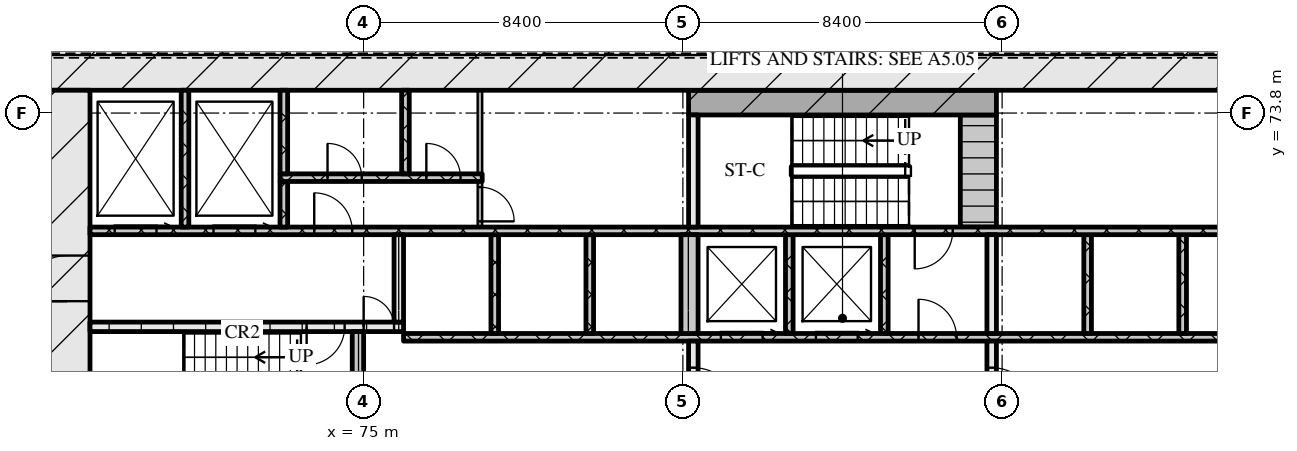
"""IFC4 building model, lengths in metres.
Left out: names, types, materials, properties, quantities, classifications, styles, units other than length and angle.
Written with IfcOpenShell. Run it as: python <this file> out.ifc"""

import sys

from ifc_helpers import new_model, si_unit, direction, frame, frame_2d, origin, place, context, subcontext, project, spatial, rectangle, extrude, element, fill, save


model = new_model("IFC4")
c1 = context("Model", 3, precision=1e-05, world=origin(), true_north=direction((0.0, 1.0)))
c2 = subcontext(c1, "Body", "Model", "MODEL_VIEW")
j1 = project(units=[si_unit("LENGTHUNIT", "METRE"), si_unit("PLANEANGLEUNIT", "RADIAN")], contexts=[c1])
p1 = place(None, origin())
s1 = spatial("IfcSite", under=j1, at=p1, CompositionType="ELEMENT")
p2 = place(p1, origin())
s2 = spatial("IfcBuilding", under=s1, at=p2, CompositionType="ELEMENT")
p3 = place(p2, frame((0.0, 0.0, 19.2)))
s3 = spatial("IfcBuildingStorey", under=s2, at=p3, CompositionType="ELEMENT", Elevation=19.2)
p4 = place(p3, frame((66.6, 75.0, 0.0), z_axis=(0.0, 0.0, 1.0), x_axis=(1.0, 0.0, 0.0)))
e1 = element("IfcWall", 1, at=p4, inside=s3, PredefinedType="SOLIDWALL", context=c2, shape_type="SweptSolid", body=[
    extrude(rectangle(XDim=42.0, YDim=1.2, at=frame_2d((21.0, 0.0))), origin(), (0.0, 0.0, 1.0), 4.2),
])
p5 = place(p3, frame((67.2, 62.4, 0.0), z_axis=(0.0, 0.0, 1.0), x_axis=(0.0, 1.0, 0.0)))
e2 = element("IfcWall", 2, at=p5, inside=s3, PredefinedType="SOLIDWALL", context=c2, shape_type="SweptSolid", body=[
    extrude(rectangle(XDim=12.0, YDim=1.2, at=frame_2d((6.0, 0.0))), origin(), (0.0, 0.0, 1.0), 4.2),
])
p6 = place(p5, frame((6.45, 0.0, 0.0)))
e3 = element("IfcOpeningElement", 3, at=p6, cuts=e2, PredefinedType="OPENING", context=c2, shape_type="SweptSolid", body=[
    extrude(rectangle(XDim=1.2, YDim=2.1, at=frame_2d((0.6, 1.05))), frame((0.0, 0.61, 0.0), z_axis=(0.0, -1.0, 0.0), x_axis=(1.0, 0.0, 0.0)), (0.0, 0.0, 1.0), 1.22),
])
p7 = place(p3, frame((74.85, 65.2, 0.0), z_axis=(0.0, 0.0, 1.0), x_axis=(0.0, 1.0, 0.0)))
e4 = element("IfcWall", 4, at=p7, inside=s3, PredefinedType="SOLIDWALL", context=c2, shape_type="SweptSolid", body=[
    extrude(rectangle(XDim=2.85, YDim=0.3, at=frame_2d((1.425, 0.0))), origin(), (0.0, 0.0, 1.0), 4.2),
])
p8 = place(p3, frame((83.675, 65.2, 0.0), z_axis=(0.0, 0.0, 1.0), x_axis=(0.0, 1.0, 0.0)))
e5 = element("IfcWall", 5, at=p8, inside=s3, PredefinedType="SOLIDWALL", context=c2, shape_type="SweptSolid", body=[
    extrude(rectangle(XDim=2.6, YDim=0.25, at=frame_2d((1.3, 0.0))), origin(), (0.0, 0.0, 1.0), 4.2),
])
p9 = place(p8, frame((0.7, 0.0, 0.0)))
e6 = element("IfcOpeningElement", 6, at=p9, cuts=e5, PredefinedType="OPENING", context=c2, shape_type="SweptSolid", body=[
    extrude(rectangle(XDim=1.2, YDim=2.1, at=frame_2d((0.6, 1.05))), frame((0.0, 0.135, 0.0), z_axis=(0.0, -1.0, 0.0), x_axis=(1.0, 0.0, 0.0)), (0.0, 0.0, 1.0), 0.27),
])
p10 = place(p3, frame((91.525, 65.2, 0.0), z_axis=(0.0, 0.0, 1.0), x_axis=(0.0, 1.0, 0.0)))
e7 = element("IfcWall", 7, at=p10, inside=s3, PredefinedType="SOLIDWALL", context=c2, shape_type="SweptSolid", body=[
    extrude(rectangle(XDim=2.6, YDim=0.25, at=frame_2d((1.3, 0.0))), origin(), (0.0, 0.0, 1.0), 4.2),
])
p11 = place(p10, frame((0.7, 0.0, 0.0)))
e8 = element("IfcOpeningElement", 8, at=p11, cuts=e7, PredefinedType="OPENING", context=c2, shape_type="SweptSolid", body=[
    extrude(rectangle(XDim=1.2, YDim=2.1, at=frame_2d((0.6, 1.05))), frame((0.0, 0.135, 0.0), z_axis=(0.0, -1.0, 0.0), x_axis=(1.0, 0.0, 0.0)), (0.0, 0.0, 1.0), 0.27),
])
p12 = place(p3, frame((76.05, 67.9, 0.0), z_axis=(0.0, 0.0, 1.0), x_axis=(1.0, 0.0, 0.0)))
e9 = element("IfcWall", 9, at=p12, inside=s3, PredefinedType="SOLIDWALL", context=c2, shape_type="SweptSolid", body=[
    extrude(rectangle(XDim=23.1, YDim=0.2, at=frame_2d((11.55, 0.0))), origin(), (0.0, 0.0, 1.0), 4.2),
])
p13 = place(p12, frame((8.35, 0.0, 0.0)))
e10 = element("IfcOpeningElement", 10, at=p13, cuts=e9, PredefinedType="OPENING", context=c2, shape_type="SweptSolid", body=[
    extrude(rectangle(XDim=1.1, YDim=2.1, at=frame_2d((0.55, 1.05))), frame((0.0, 0.11, 0.0), z_axis=(0.0, -1.0, 0.0), x_axis=(1.0, 0.0, 0.0)), (0.0, 0.0, 1.0), 0.22),
])
p14 = place(p12, frame((10.85, 0.0, 0.0)))
e11 = element("IfcOpeningElement", 11, at=p14, cuts=e9, PredefinedType="OPENING", context=c2, shape_type="SweptSolid", body=[
    extrude(rectangle(XDim=1.1, YDim=2.1, at=frame_2d((0.55, 1.05))), frame((0.0, 0.11, 0.0), z_axis=(0.0, -1.0, 0.0), x_axis=(1.0, 0.0, 0.0)), (0.0, 0.0, 1.0), 0.22),
])
p15 = place(p12, frame((13.55, 0.0, 0.0)))
e12 = element("IfcOpeningElement", 12, at=p15, cuts=e9, PredefinedType="OPENING", context=c2, shape_type="SweptSolid", body=[
    extrude(rectangle(XDim=1.0, YDim=2.1, at=frame_2d((0.5, 1.05))), frame((0.0, 0.11, 0.0), z_axis=(0.0, -1.0, 0.0), x_axis=(1.0, 0.0, 0.0)), (0.0, 0.0, 1.0), 0.22),
])
for number, where, z_axis, x_axis in (
    (13, (78.45, 68.0, 0.0), (0.0, 0.0, 1.0), (0.0, 1.0, 0.0)),
    (14, (80.95, 68.0, 0.0), (0.0, 0.0, 1.0), (0.0, 1.0, 0.0)),
):
    element("IfcWall", number, at=place(p3, frame(where, z_axis=z_axis, x_axis=x_axis)), inside=s3, PredefinedType="SOLIDWALL", context=c2, shape_type="SweptSolid", body=[
        extrude(rectangle(XDim=2.6, YDim=0.2, at=frame_2d((1.3, 0.0))), origin(), (0.0, 0.0, 1.0), 4.2),
    ])
p16 = place(p3, frame((83.575, 68.0, 0.0), z_axis=(0.0, 0.0, 1.0), x_axis=(0.0, 1.0, 0.0)))
e15 = element("IfcWall", 15, at=p16, inside=s3, PredefinedType="SOLIDWALL", context=c2, shape_type="SweptSolid", body=[
    extrude(rectangle(XDim=2.6, YDim=0.45, at=frame_2d((1.3, 0.0))), origin(), (0.0, 0.0, 1.0), 4.2),
])
for number, where, z_axis, x_axis in (
    (16, (86.2, 68.0, 0.0), (0.0, 0.0, 1.0), (0.0, 1.0, 0.0)),
    (17, (88.7, 68.0, 0.0), (0.0, 0.0, 1.0), (0.0, 1.0, 0.0)),
):
    element("IfcWall", number, at=place(p3, frame(where, z_axis=z_axis, x_axis=x_axis)), inside=s3, PredefinedType="SOLIDWALL", context=c2, shape_type="SweptSolid", body=[
        extrude(rectangle(XDim=2.6, YDim=0.2, at=frame_2d((1.3, 0.0))), origin(), (0.0, 0.0, 1.0), 4.2),
    ])
p17 = place(p3, frame((91.525, 68.0, 0.0), z_axis=(0.0, 0.0, 1.0), x_axis=(0.0, 1.0, 0.0)))
e18 = element("IfcWall", 18, at=p17, inside=s3, PredefinedType="SOLIDWALL", context=c2, shape_type="SweptSolid", body=[
    extrude(rectangle(XDim=2.6, YDim=0.25, at=frame_2d((1.3, 0.0))), origin(), (0.0, 0.0, 1.0), 4.2),
])
for number, where, z_axis, x_axis in (
    (19, (94.05, 68.0, 0.0), (0.0, 0.0, 1.0), (0.0, 1.0, 0.0)),
    (20, (96.55, 68.0, 0.0), (0.0, 0.0, 1.0), (0.0, 1.0, 0.0)),
):
    element("IfcWall", number, at=place(p3, frame(where, z_axis=z_axis, x_axis=x_axis)), inside=s3, PredefinedType="SOLIDWALL", context=c2, shape_type="SweptSolid", body=[
        extrude(rectangle(XDim=2.6, YDim=0.2, at=frame_2d((1.3, 0.0))), origin(), (0.0, 0.0, 1.0), 4.2),
    ])
p18 = place(p3, frame((67.8, 68.175, 0.0), z_axis=(0.0, 0.0, 1.0), x_axis=(1.0, 0.0, 0.0)))
e21 = element("IfcWall", 21, at=p18, inside=s3, PredefinedType="SOLIDWALL", context=c2, shape_type="SweptSolid", body=[
    extrude(rectangle(XDim=8.25, YDim=0.25, at=frame_2d((4.125, 0.0))), origin(), (0.0, 0.0, 1.0), 4.2),
])
p19 = place(p18, frame((5.7, 0.0, 0.0)))
e22 = element("IfcOpeningElement", 22, at=p19, cuts=e21, PredefinedType="OPENING", context=c2, shape_type="SweptSolid", body=[
    extrude(rectangle(XDim=1.0, YDim=2.1, at=frame_2d((0.5, 1.05))), frame((0.0, 0.135, 0.0), z_axis=(0.0, -1.0, 0.0), x_axis=(1.0, 0.0, 0.0)), (0.0, 0.0, 1.0), 0.27),
])
p20 = place(p18, frame((7.2, 0.0, 0.0)))
e23 = element("IfcOpeningElement", 23, at=p20, cuts=e21, PredefinedType="OPENING", context=c2, shape_type="SweptSolid", body=[
    extrude(rectangle(XDim=0.8, YDim=2.1, at=frame_2d((0.4, 1.05))), frame((0.0, 0.135, 0.0), z_axis=(0.0, -1.0, 0.0), x_axis=(1.0, 0.0, 0.0)), (0.0, 0.0, 1.0), 0.27),
])
p21 = place(p3, frame((75.925, 68.3, 0.0), z_axis=(0.0, 0.0, 1.0), x_axis=(0.0, 1.0, 0.0)))
e24 = element("IfcWall", 24, at=p21, inside=s3, PredefinedType="SOLIDWALL", context=c2, shape_type="SweptSolid", body=[
    extrude(rectangle(XDim=2.3, YDim=0.25, at=frame_2d((1.15, 0.0))), origin(), (0.0, 0.0, 1.0), 4.2),
])
p22 = place(p3, frame((67.8, 70.7, 0.0), z_axis=(0.0, 0.0, 1.0), x_axis=(1.0, 0.0, 0.0)))
e25 = element("IfcWall", 25, at=p22, inside=s3, PredefinedType="SOLIDWALL", context=c2, shape_type="SweptSolid", body=[
    extrude(rectangle(XDim=39.6, YDim=0.2, at=frame_2d((19.8, 0.0))), origin(), (0.0, 0.0, 1.0), 4.2),
])
p23 = place(p22, frame((0.65, 0.0, 0.0)))
e26 = element("IfcOpeningElement", 26, at=p23, cuts=e25, PredefinedType="OPENING", context=c2, shape_type="SweptSolid", body=[
    extrude(rectangle(XDim=1.1, YDim=2.1, at=frame_2d((0.55, 1.05))), frame((0.0, 0.11, 0.0), z_axis=(0.0, -1.0, 0.0), x_axis=(1.0, 0.0, 0.0)), (0.0, 0.0, 1.0), 0.22),
])
p24 = place(p22, frame((3.25, 0.0, 0.0)))
e27 = element("IfcOpeningElement", 27, at=p24, cuts=e25, PredefinedType="OPENING", context=c2, shape_type="SweptSolid", body=[
    extrude(rectangle(XDim=1.1, YDim=2.1, at=frame_2d((0.55, 1.05))), frame((0.0, 0.11, 0.0), z_axis=(0.0, -1.0, 0.0), x_axis=(1.0, 0.0, 0.0)), (0.0, 0.0, 1.0), 0.22),
])
p25 = place(p22, frame((5.9, 0.0, 0.0)))
e28 = element("IfcOpeningElement", 28, at=p25, cuts=e25, PredefinedType="OPENING", context=c2, shape_type="SweptSolid", body=[
    extrude(rectangle(XDim=1.0, YDim=2.1, at=frame_2d((0.5, 1.05))), frame((0.0, 0.11, 0.0), z_axis=(0.0, -1.0, 0.0), x_axis=(1.0, 0.0, 0.0)), (0.0, 0.0, 1.0), 0.22),
])
p26 = place(p22, frame((21.7, 0.0, 0.0)))
e29 = element("IfcOpeningElement", 29, at=p26, cuts=e25, PredefinedType="OPENING", context=c2, shape_type="SweptSolid", body=[
    extrude(rectangle(XDim=1.0, YDim=2.1, at=frame_2d((0.5, 1.05))), frame((0.0, 0.11, 0.0), z_axis=(0.0, -1.0, 0.0), x_axis=(1.0, 0.0, 0.0)), (0.0, 0.0, 1.0), 0.22),
])
p27 = place(p22, frame((32.7, 0.0, 0.0)))
e30 = element("IfcOpeningElement", 30, at=p27, cuts=e25, PredefinedType="OPENING", context=c2, shape_type="SweptSolid", body=[
    extrude(rectangle(XDim=1.0, YDim=2.1, at=frame_2d((0.5, 1.05))), frame((0.0, 0.11, 0.0), z_axis=(0.0, -1.0, 0.0), x_axis=(1.0, 0.0, 0.0)), (0.0, 0.0, 1.0), 0.22),
])
p28 = place(p22, frame((35.25, 0.0, 0.0)))
e31 = element("IfcOpeningElement", 31, at=p28, cuts=e25, PredefinedType="OPENING", context=c2, shape_type="SweptSolid", body=[
    extrude(rectangle(XDim=1.1, YDim=2.1, at=frame_2d((0.55, 1.05))), frame((0.0, 0.11, 0.0), z_axis=(0.0, -1.0, 0.0), x_axis=(1.0, 0.0, 0.0)), (0.0, 0.0, 1.0), 0.22),
])
p29 = place(p22, frame((37.85, 0.0, 0.0)))
e32 = element("IfcOpeningElement", 32, at=p29, cuts=e25, PredefinedType="OPENING", context=c2, shape_type="SweptSolid", body=[
    extrude(rectangle(XDim=1.1, YDim=2.1, at=frame_2d((0.55, 1.05))), frame((0.0, 0.11, 0.0), z_axis=(0.0, -1.0, 0.0), x_axis=(1.0, 0.0, 0.0)), (0.0, 0.0, 1.0), 0.22),
])
p30 = place(p3, frame((70.3, 70.8, 0.0), z_axis=(0.0, 0.0, 1.0), x_axis=(0.0, 1.0, 0.0)))
e33 = element("IfcWall", 33, at=p30, inside=s3, PredefinedType="SOLIDWALL", context=c2, shape_type="SweptSolid", body=[
    extrude(rectangle(XDim=3.6, YDim=0.2, at=frame_2d((1.8, 0.0))), origin(), (0.0, 0.0, 1.0), 4.2),
])
p31 = place(p3, frame((72.9, 70.8, 0.0), z_axis=(0.0, 0.0, 1.0), x_axis=(0.0, 1.0, 0.0)))
e34 = element("IfcWall", 34, at=p31, inside=s3, PredefinedType="SOLIDWALL", context=c2, shape_type="SweptSolid", body=[
    extrude(rectangle(XDim=1.2, YDim=0.2, at=frame_2d((0.6, 0.0))), origin(), (0.0, 0.0, 1.0), 4.2),
])
p32 = place(p3, frame((78.06, 70.8, 0.0), z_axis=(0.0, 0.0, 1.0), x_axis=(0.0, 1.0, 0.0)))
e35 = element("IfcWall", 35, at=p32, inside=s3, PredefinedType="PARTITIONING", context=c2, shape_type="SweptSolid", body=[
    extrude(rectangle(XDim=1.2, YDim=0.12, at=frame_2d((0.6, 0.0))), origin(), (0.0, 0.0, 1.0), 4.2),
])
p33 = place(p32, frame((0.15, 0.0, 0.0)))
e36 = element("IfcOpeningElement", 36, at=p33, cuts=e35, PredefinedType="OPENING", context=c2, shape_type="SweptSolid", body=[
    extrude(rectangle(XDim=0.9, YDim=2.1, at=frame_2d((0.45, 1.05))), frame((0.0, 0.07, 0.0), z_axis=(0.0, -1.0, 0.0), x_axis=(1.0, 0.0, 0.0)), (0.0, 0.0, 1.0), 0.14),
])
p34 = place(p3, frame((83.675, 70.8, 0.0), z_axis=(0.0, 0.0, 1.0), x_axis=(0.0, 1.0, 0.0)))
e37 = element("IfcWall", 37, at=p34, inside=s3, PredefinedType="SOLIDWALL", context=c2, shape_type="SweptSolid", body=[
    extrude(rectangle(XDim=2.95, YDim=0.25, at=frame_2d((1.475, 0.0))), origin(), (0.0, 0.0, 1.0), 4.2),
])
p35 = place(p3, frame((91.175, 70.8, 0.0), z_axis=(0.0, 0.0, 1.0), x_axis=(0.0, 1.0, 0.0)))
e38 = element("IfcWall", 38, at=p35, inside=s3, PredefinedType="SOLIDWALL", context=c2, shape_type="SweptSolid", body=[
    extrude(rectangle(XDim=2.95, YDim=0.95, at=frame_2d((1.475, 0.0))), origin(), (0.0, 0.0, 1.0), 4.2),
])
p36 = place(p3, frame((72.8, 72.1, 0.0), z_axis=(0.0, 0.0, 1.0), x_axis=(1.0, 0.0, 0.0)))
e39 = element("IfcWall", 39, at=p36, inside=s3, PredefinedType="SOLIDWALL", context=c2, shape_type="SweptSolid", body=[
    extrude(rectangle(XDim=5.32, YDim=0.2, at=frame_2d((2.66, 0.0))), origin(), (0.0, 0.0, 1.0), 4.2),
])
p37 = place(p36, frame((1.25, 0.0, 0.0)))
e40 = element("IfcOpeningElement", 40, at=p37, cuts=e39, PredefinedType="OPENING", context=c2, shape_type="SweptSolid", body=[
    extrude(rectangle(XDim=0.9, YDim=2.1, at=frame_2d((0.45, 1.05))), frame((0.0, 0.11, 0.0), z_axis=(0.0, -1.0, 0.0), x_axis=(1.0, 0.0, 0.0)), (0.0, 0.0, 1.0), 0.22),
])
p38 = place(p36, frame((3.85, 0.0, 0.0)))
e41 = element("IfcOpeningElement", 41, at=p38, cuts=e39, PredefinedType="OPENING", context=c2, shape_type="SweptSolid", body=[
    extrude(rectangle(XDim=0.9, YDim=2.1, at=frame_2d((0.45, 1.05))), frame((0.0, 0.11, 0.0), z_axis=(0.0, -1.0, 0.0), x_axis=(1.0, 0.0, 0.0)), (0.0, 0.0, 1.0), 0.22),
])
for number, where, z_axis, x_axis in (
    (42, (72.9, 72.2, 0.0), (0.0, 0.0, 1.0), (0.0, 1.0, 0.0)),
    (43, (76.1, 72.2, 0.0), (0.0, 0.0, 1.0), (0.0, 1.0, 0.0)),
):
    element("IfcWall", number, at=place(p3, frame(where, z_axis=z_axis, x_axis=x_axis)), inside=s3, PredefinedType="SOLIDWALL", context=c2, shape_type="SweptSolid", body=[
        extrude(rectangle(XDim=2.2, YDim=0.2, at=frame_2d((1.1, 0.0))), origin(), (0.0, 0.0, 1.0), 4.2),
    ])
p39 = place(p3, frame((78.06, 72.2, 0.0), z_axis=(0.0, 0.0, 1.0), x_axis=(0.0, 1.0, 0.0)))
e44 = element("IfcWall", 44, at=p39, inside=s3, PredefinedType="PARTITIONING", context=c2, shape_type="SweptSolid", body=[
    extrude(rectangle(XDim=2.2, YDim=0.12, at=frame_2d((1.1, 0.0))), origin(), (0.0, 0.0, 1.0), 4.2),
])
p40 = place(p3, frame((83.55, 74.075, 0.0), z_axis=(0.0, 0.0, 1.0), x_axis=(1.0, 0.0, 0.0)))
e45 = element("IfcWall", 45, at=p40, inside=s3, PredefinedType="SOLIDWALL", context=c2, shape_type="SweptSolid", body=[
    extrude(rectangle(XDim=8.1, YDim=0.65, at=frame_2d((4.05, 0.0))), origin(), (0.0, 0.0, 1.0), 4.2),
])
p41 = place(p9, origin())
e46 = element("IfcDoor", 46, at=p41, inside=s3, OperationType="SINGLE_SWING_RIGHT", PredefinedType="DOOR", context=c2, shape_type="SweptSolid", body=[
    extrude(rectangle(XDim=1.2, YDim=2.1, at=frame_2d((0.6, 1.05))), frame((0.0, 0.025, 0.0), z_axis=(0.0, -1.0, 0.0), x_axis=(1.0, 0.0, 0.0)), (0.0, 0.0, 1.0), 0.05),
])
fill(e6, e46)
p42 = place(p11, origin())
e47 = element("IfcDoor", 47, at=p42, inside=s3, OperationType="SINGLE_SWING_RIGHT", PredefinedType="DOOR", context=c2, shape_type="SweptSolid", body=[
    extrude(rectangle(XDim=1.2, YDim=2.1, at=frame_2d((0.6, 1.05))), frame((0.0, 0.025, 0.0), z_axis=(0.0, -1.0, 0.0), x_axis=(1.0, 0.0, 0.0)), (0.0, 0.0, 1.0), 0.05),
])
fill(e8, e47)
p43 = place(p13, origin())
e48 = element("IfcDoor", 48, at=p43, inside=s3, OperationType="SLIDING_TO_RIGHT", PredefinedType="DOOR", context=c2, shape_type="SweptSolid", body=[
    extrude(rectangle(XDim=1.1, YDim=2.1, at=frame_2d((0.55, 1.05))), frame((0.0, 0.025, 0.0), z_axis=(0.0, -1.0, 0.0), x_axis=(1.0, 0.0, 0.0)), (0.0, 0.0, 1.0), 0.05),
])
fill(e10, e48)
p44 = place(p14, origin())
e49 = element("IfcDoor", 49, at=p44, inside=s3, OperationType="SLIDING_TO_RIGHT", PredefinedType="DOOR", context=c2, shape_type="SweptSolid", body=[
    extrude(rectangle(XDim=1.1, YDim=2.1, at=frame_2d((0.55, 1.05))), frame((0.0, 0.025, 0.0), z_axis=(0.0, -1.0, 0.0), x_axis=(1.0, 0.0, 0.0)), (0.0, 0.0, 1.0), 0.05),
])
fill(e11, e49)
p45 = place(p15, origin())
e50 = element("IfcDoor", 50, at=p45, inside=s3, OperationType="SINGLE_SWING_LEFT", PredefinedType="DOOR", context=c2, shape_type="SweptSolid", body=[
    extrude(rectangle(XDim=1.0, YDim=2.1, at=frame_2d((0.5, 1.05))), frame((0.0, 0.025, 0.0), z_axis=(0.0, -1.0, 0.0), x_axis=(1.0, 0.0, 0.0)), (0.0, 0.0, 1.0), 0.05),
])
fill(e12, e50)
p46 = place(p19, origin())
e51 = element("IfcDoor", 51, at=p46, inside=s3, OperationType="SINGLE_SWING_RIGHT", PredefinedType="DOOR", context=c2, shape_type="SweptSolid", body=[
    extrude(rectangle(XDim=1.0, YDim=2.1, at=frame_2d((0.5, 1.05))), frame((0.0, 0.025, 0.0), z_axis=(0.0, -1.0, 0.0), x_axis=(1.0, 0.0, 0.0)), (0.0, 0.0, 1.0), 0.05),
])
fill(e22, e51)
p47 = place(p20, origin())
e52 = element("IfcDoor", 52, at=p47, inside=s3, OperationType="SINGLE_SWING_LEFT", PredefinedType="DOOR", context=c2, shape_type="SweptSolid", body=[
    extrude(rectangle(XDim=0.8, YDim=2.1, at=frame_2d((0.4, 1.05))), frame((0.0, 0.025, 0.0), z_axis=(0.0, -1.0, 0.0), x_axis=(1.0, 0.0, 0.0)), (0.0, 0.0, 1.0), 0.05),
])
fill(e23, e52)
p48 = place(p6, origin())
e53 = element("IfcDoor", 53, at=p48, inside=s3, OperationType="SINGLE_SWING_LEFT", PredefinedType="DOOR", context=c2, shape_type="SweptSolid", body=[
    extrude(rectangle(XDim=1.2, YDim=2.1, at=frame_2d((0.6, 1.05))), frame((0.0, 0.025, 0.0), z_axis=(0.0, -1.0, 0.0), x_axis=(1.0, 0.0, 0.0)), (0.0, 0.0, 1.0), 0.05),
])
fill(e3, e53)
p49 = place(p23, origin())
e54 = element("IfcDoor", 54, at=p49, inside=s3, OperationType="SLIDING_TO_RIGHT", PredefinedType="DOOR", context=c2, shape_type="SweptSolid", body=[
    extrude(rectangle(XDim=1.1, YDim=2.1, at=frame_2d((0.55, 1.05))), frame((0.0, 0.025, 0.0), z_axis=(0.0, -1.0, 0.0), x_axis=(1.0, 0.0, 0.0)), (0.0, 0.0, 1.0), 0.05),
])
fill(e26, e54)
p50 = place(p24, origin())
e55 = element("IfcDoor", 55, at=p50, inside=s3, OperationType="SLIDING_TO_RIGHT", PredefinedType="DOOR", context=c2, shape_type="SweptSolid", body=[
    extrude(rectangle(XDim=1.1, YDim=2.1, at=frame_2d((0.55, 1.05))), frame((0.0, 0.025, 0.0), z_axis=(0.0, -1.0, 0.0), x_axis=(1.0, 0.0, 0.0)), (0.0, 0.0, 1.0), 0.05),
])
fill(e27, e55)
p51 = place(p25, origin())
e56 = element("IfcDoor", 56, at=p51, inside=s3, OperationType="SINGLE_SWING_LEFT", PredefinedType="DOOR", context=c2, shape_type="SweptSolid", body=[
    extrude(rectangle(XDim=1.0, YDim=2.1, at=frame_2d((0.5, 1.05))), frame((0.0, 0.025, 0.0), z_axis=(0.0, -1.0, 0.0), x_axis=(1.0, 0.0, 0.0)), (0.0, 0.0, 1.0), 0.05),
])
fill(e28, e56)
p52 = place(p26, origin())
e57 = element("IfcDoor", 57, at=p52, inside=s3, OperationType="SINGLE_SWING_RIGHT", PredefinedType="DOOR", context=c2, shape_type="SweptSolid", body=[
    extrude(rectangle(XDim=1.0, YDim=2.1, at=frame_2d((0.5, 1.05))), frame((0.0, 0.025, 0.0), z_axis=(0.0, -1.0, 0.0), x_axis=(1.0, 0.0, 0.0)), (0.0, 0.0, 1.0), 0.05),
])
fill(e29, e57)
p53 = place(p33, origin())
e58 = element("IfcDoor", 58, at=p53, inside=s3, OperationType="SINGLE_SWING_RIGHT", PredefinedType="DOOR", context=c2, shape_type="SweptSolid", body=[
    extrude(rectangle(XDim=0.9, YDim=2.1, at=frame_2d((0.45, 1.05))), frame((0.0, 0.025, 0.0), z_axis=(0.0, -1.0, 0.0), x_axis=(1.0, 0.0, 0.0)), (0.0, 0.0, 1.0), 0.05),
])
fill(e36, e58)
p54 = place(p37, origin())
e59 = element("IfcDoor", 59, at=p54, inside=s3, OperationType="SINGLE_SWING_LEFT", PredefinedType="DOOR", context=c2, shape_type="SweptSolid", body=[
    extrude(rectangle(XDim=0.9, YDim=2.1, at=frame_2d((0.45, 1.05))), frame((0.0, 0.025, 0.0), z_axis=(0.0, -1.0, 0.0), x_axis=(1.0, 0.0, 0.0)), (0.0, 0.0, 1.0), 0.05),
])
fill(e40, e59)
p55 = place(p38, origin())
e60 = element("IfcDoor", 60, at=p55, inside=s3, OperationType="SINGLE_SWING_LEFT", PredefinedType="DOOR", context=c2, shape_type="SweptSolid", body=[
    extrude(rectangle(XDim=0.9, YDim=2.1, at=frame_2d((0.45, 1.05))), frame((0.0, 0.025, 0.0), z_axis=(0.0, -1.0, 0.0), x_axis=(1.0, 0.0, 0.0)), (0.0, 0.0, 1.0), 0.05),
])
fill(e41, e60)
save(model, sys.argv[1])
